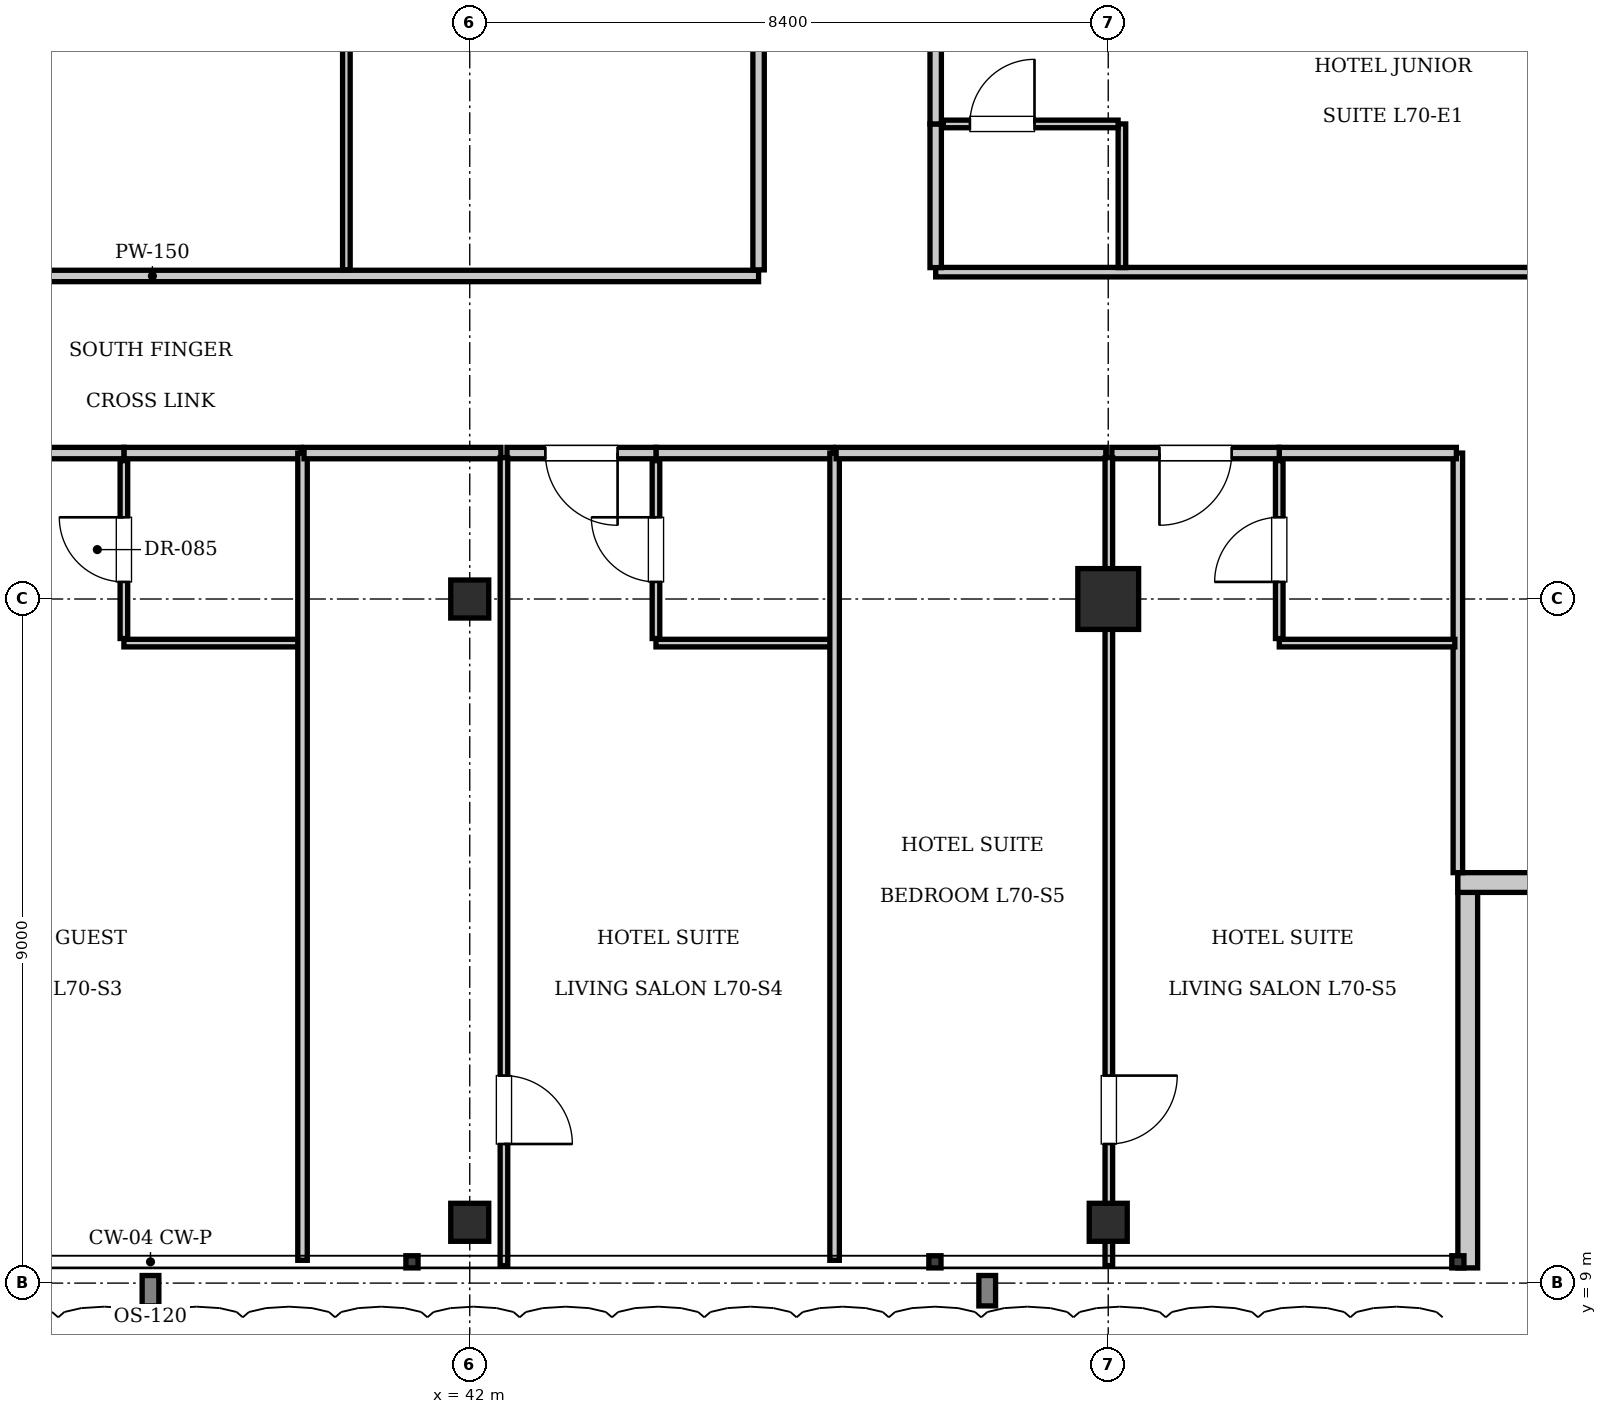
"""IFC4 building model, lengths in metres.
Left out: names, types, materials, properties, quantities, classifications, styles, units other than length and angle.
Written with IfcOpenShell. Run it as: python <this file> out.ifc"""

import sys

from ifc_helpers import new_model, si_unit, direction, frame, frame_2d, origin, origin_2d, place, context, subcontext, project, spatial, rectangle, i_section, extrude, element, fill, save


model = new_model("IFC4")
c1 = context("Model", 3, precision=1e-05, world=origin(), true_north=direction((0.0, 1.0)))
c2 = subcontext(c1, "Body", "Model", "MODEL_VIEW")
j1 = project(units=[si_unit("LENGTHUNIT", "METRE"), si_unit("PLANEANGLEUNIT", "RADIAN")], contexts=[c1])
p1 = place(None, origin())
s1 = spatial("IfcSite", under=j1, at=p1, CompositionType="ELEMENT")
p2 = place(p1, origin())
s2 = spatial("IfcBuilding", under=s1, at=p2, CompositionType="ELEMENT")
p3 = place(p2, frame((0.0, 0.0, 285.6)))
s3 = spatial("IfcBuildingStorey", under=s2, at=p3, CompositionType="ELEMENT", Elevation=285.6)
p4 = place(p3, frame((50.4, 18.0, 0.0), z_axis=(0.0, 0.0, 1.0), x_axis=(1.0, 0.0, 0.0)))
e1 = element("IfcColumn", 1, at=p4, inside=s3, PredefinedType="COLUMN", context=c2, shape_type="SweptSolid", body=[
    extrude(rectangle(XDim=0.8, YDim=0.8, at=origin_2d()), origin(), (0.0, 0.0, 1.0), 3.85),
])
for number, where, z_axis, x_axis in (
    (2, (42.0, 18.0, 0.0), (0.0, 0.0, 1.0), (1.0, 0.0, 0.0)),
    (3, (42.0, 9.8, 0.0), (0.0, 0.0, 1.0), (1.0, 0.0, 0.0)),
    (4, (50.4, 9.8, 0.0), (0.0, 0.0, 1.0), (1.0, 0.0, 0.0)),
):
    element("IfcColumn", number, at=place(p3, frame(where, z_axis=z_axis, x_axis=x_axis)), inside=s3, PredefinedType="COLUMN", context=c2, shape_type="SweptSolid", body=[
        extrude(i_section(OverallWidth=0.5, OverallDepth=0.5, WebThickness=0.022, FlangeThickness=0.032, at=origin_2d()), origin(), (0.0, 0.0, 1.0), 3.85),
    ])
p5 = place(p3, frame((55.13, 14.4, 0.0), z_axis=(0.0, 0.0, 1.0), x_axis=(0.0, -1.0, 0.0)))
e5 = element("IfcWall", 5, at=p5, inside=s3, PredefinedType="SOLIDWALL", context=c2, shape_type="SweptSolid", body=[
    extrude(rectangle(XDim=5.2, YDim=0.26, at=frame_2d((2.6, 0.0))), origin(), (0.0, 0.0, 1.0), 3.61),
])
p6 = place(p3, frame((60.2, 14.27, 0.0), z_axis=(0.0, 0.0, 1.0), x_axis=(-1.0, 0.0, 0.0)))
e6 = element("IfcWall", 6, at=p6, inside=s3, PredefinedType="SOLIDWALL", context=c2, shape_type="SweptSolid", body=[
    extrude(rectangle(XDim=5.2, YDim=0.26, at=frame_2d((2.6, 0.0))), origin(), (0.0, 0.0, 1.0), 3.61),
])
p7 = place(p6, frame((1.6, 0.0, 0.9)))
e7 = element("IfcOpeningElement", 7, at=p7, cuts=e6, PredefinedType="OPENING", context=c2, shape_type="SweptSolid", body=[
    extrude(rectangle(XDim=2.0, YDim=2.2, at=frame_2d((1.0, 1.1))), frame((0.0, 0.14, 0.0), z_axis=(0.0, -1.0, 0.0), x_axis=(1.0, 0.0, 0.0)), (0.0, 0.0, 1.0), 0.28),
])
p8 = place(p3, frame((29.85, 22.25, 0.0), z_axis=(0.0, 0.0, 1.0), x_axis=(1.0, 0.0, 0.0)))
e8 = element("IfcWall", 8, at=p8, inside=s3, PredefinedType="PARTITIONING", context=c2, shape_type="SweptSolid", body=[
    extrude(rectangle(XDim=15.95, YDim=0.15, at=frame_2d((7.975, 0.0))), origin(), (0.0, 0.0, 1.0), 3.61),
])
p9 = place(p3, frame((45.8, 22.33, 0.0), z_axis=(0.0, 0.0, 1.0), x_axis=(0.0, 1.0, 0.0)))
e9 = element("IfcWall", 9, at=p9, inside=s3, PredefinedType="PARTITIONING", context=c2, shape_type="SweptSolid", body=[
    extrude(rectangle(XDim=7.69, YDim=0.15, at=frame_2d((3.845, 0.0))), origin(), (0.0, 0.0, 1.0), 3.61),
])
p10 = place(p3, frame((40.377, 22.33, 0.0), z_axis=(0.0, 0.0, 1.0), x_axis=(0.0, 1.0, 0.0)))
e10 = element("IfcWall", 10, at=p10, inside=s3, PredefinedType="PARTITIONING", context=c2, shape_type="SweptSolid", body=[
    extrude(rectangle(XDim=7.69, YDim=0.1, at=frame_2d((3.845, 0.0))), origin(), (0.0, 0.0, 1.0), 3.61),
])
p11 = place(p3, frame((55.0, 14.4, 0.0), z_axis=(0.0, 0.0, 1.0), x_axis=(0.0, 1.0, 0.0)))
e11 = element("IfcWall", 11, at=p11, inside=s3, PredefinedType="PARTITIONING", context=c2, shape_type="SweptSolid", body=[
    extrude(rectangle(XDim=5.52, YDim=0.125, at=frame_2d((2.76, 0.0))), origin(), (0.0, 0.0, 1.0), 3.61),
])
p12 = place(p3, frame((37.45, 19.92, 0.0), z_axis=(0.0, 0.0, 1.0), x_axis=(1.0, 0.0, 0.0)))
e12 = element("IfcWall", 12, at=p12, inside=s3, PredefinedType="PARTITIONING", context=c2, shape_type="SweptSolid", body=[
    extrude(rectangle(XDim=2.33, YDim=0.15, at=frame_2d((1.165, 0.0))), origin(), (0.0, 0.0, 1.0), 3.61),
])
p13 = place(p3, frame((37.45, 17.42, 0.0), z_axis=(0.0, 0.0, 1.0), x_axis=(1.0, 0.0, 0.0)))
e13 = element("IfcWall", 13, at=p13, inside=s3, PredefinedType="PARTITIONING", context=c2, shape_type="SweptSolid", body=[
    extrude(rectangle(XDim=2.31, YDim=0.1, at=frame_2d((1.155, 0.0))), origin(), (0.0, 0.0, 1.0), 3.61),
])
p14 = place(p3, frame((37.45, 17.48, 0.0), z_axis=(0.0, 0.0, 1.0), x_axis=(0.0, 1.0, 0.0)))
e14 = element("IfcWall", 14, at=p14, inside=s3, PredefinedType="PARTITIONING", context=c2, shape_type="SweptSolid", body=[
    extrude(rectangle(XDim=2.34, YDim=0.1, at=frame_2d((1.17, 0.0))), origin(), (0.0, 0.0, 1.0), 3.61),
])
p15 = place(p14, frame((0.745, 0.0, 0.0)))
e15 = element("IfcOpeningElement", 15, at=p15, cuts=e14, PredefinedType="OPENING", context=c2, shape_type="SweptSolid", body=[
    extrude(rectangle(XDim=0.85, YDim=2.1, at=frame_2d((0.425, 1.05))), frame((0.0, 0.06, 0.0), z_axis=(0.0, -1.0, 0.0), x_axis=(1.0, 0.0, 0.0)), (0.0, 0.0, 1.0), 0.12),
])
p16 = place(p3, frame((33.28, 19.92, 0.0), z_axis=(0.0, 0.0, 1.0), x_axis=(1.0, 0.0, 0.0)))
e16 = element("IfcWall", 16, at=p16, inside=s3, PredefinedType="PARTITIONING", context=c2, shape_type="SweptSolid", body=[
    extrude(rectangle(XDim=4.17, YDim=0.15, at=frame_2d((2.085, 0.0))), origin(), (0.0, 0.0, 1.0), 3.61),
])
p17 = place(p16, frame((1.61, 0.0, 0.0)))
e17 = element("IfcOpeningElement", 17, at=p17, cuts=e16, PredefinedType="OPENING", context=c2, shape_type="SweptSolid", body=[
    extrude(rectangle(XDim=0.95, YDim=2.15, at=frame_2d((0.475, 1.075))), frame((0.0, 0.085, 0.0), z_axis=(0.0, -1.0, 0.0), x_axis=(1.0, 0.0, 0.0)), (0.0, 0.0, 1.0), 0.17),
])
p18 = place(p3, frame((39.8, 9.3, 0.0), z_axis=(0.0, 0.0, 1.0), x_axis=(0.0, 1.0, 0.0)))
e18 = element("IfcWall", 18, at=p18, inside=s3, PredefinedType="PARTITIONING", context=c2, shape_type="SweptSolid", body=[
    extrude(rectangle(XDim=10.62, YDim=0.125, at=frame_2d((5.31, 0.0))), origin(), (0.0, 0.0, 1.0), 3.61),
])
p19 = place(p3, frame((44.45, 19.92, 0.0), z_axis=(0.0, 0.0, 1.0), x_axis=(1.0, 0.0, 0.0)))
e19 = element("IfcWall", 19, at=p19, inside=s3, PredefinedType="PARTITIONING", context=c2, shape_type="SweptSolid", body=[
    extrude(rectangle(XDim=2.33, YDim=0.15, at=frame_2d((1.165, 0.0))), origin(), (0.0, 0.0, 1.0), 3.61),
])
p20 = place(p3, frame((44.45, 17.42, 0.0), z_axis=(0.0, 0.0, 1.0), x_axis=(1.0, 0.0, 0.0)))
e20 = element("IfcWall", 20, at=p20, inside=s3, PredefinedType="PARTITIONING", context=c2, shape_type="SweptSolid", body=[
    extrude(rectangle(XDim=2.31, YDim=0.1, at=frame_2d((1.155, 0.0))), origin(), (0.0, 0.0, 1.0), 3.61),
])
p21 = place(p3, frame((44.45, 17.48, 0.0), z_axis=(0.0, 0.0, 1.0), x_axis=(0.0, 1.0, 0.0)))
e21 = element("IfcWall", 21, at=p21, inside=s3, PredefinedType="PARTITIONING", context=c2, shape_type="SweptSolid", body=[
    extrude(rectangle(XDim=2.34, YDim=0.1, at=frame_2d((1.17, 0.0))), origin(), (0.0, 0.0, 1.0), 3.61),
])
p22 = place(p21, frame((0.745, 0.0, 0.0)))
e22 = element("IfcOpeningElement", 22, at=p22, cuts=e21, PredefinedType="OPENING", context=c2, shape_type="SweptSolid", body=[
    extrude(rectangle(XDim=0.85, YDim=2.1, at=frame_2d((0.425, 1.05))), frame((0.0, 0.06, 0.0), z_axis=(0.0, -1.0, 0.0), x_axis=(1.0, 0.0, 0.0)), (0.0, 0.0, 1.0), 0.12),
])
p23 = place(p3, frame((39.82, 19.92, 0.0), z_axis=(0.0, 0.0, 1.0), x_axis=(1.0, 0.0, 0.0)))
e23 = element("IfcWall", 23, at=p23, inside=s3, PredefinedType="PARTITIONING", context=c2, shape_type="SweptSolid", body=[
    extrude(rectangle(XDim=2.59, YDim=0.15, at=frame_2d((1.295, 0.0))), origin(), (0.0, 0.0, 1.0), 3.61),
])
p24 = place(p3, frame((42.49, 19.92, 0.0), z_axis=(0.0, 0.0, 1.0), x_axis=(1.0, 0.0, 0.0)))
e24 = element("IfcWall", 24, at=p24, inside=s3, PredefinedType="PARTITIONING", context=c2, shape_type="SweptSolid", body=[
    extrude(rectangle(XDim=1.96, YDim=0.15, at=frame_2d((0.98, 0.0))), origin(), (0.0, 0.0, 1.0), 3.61),
])
p25 = place(p24, frame((0.505, 0.0, 0.0)))
e25 = element("IfcOpeningElement", 25, at=p25, cuts=e24, PredefinedType="OPENING", context=c2, shape_type="SweptSolid", body=[
    extrude(rectangle(XDim=0.95, YDim=2.15, at=frame_2d((0.475, 1.075))), frame((0.0, 0.085, 0.0), z_axis=(0.0, -1.0, 0.0), x_axis=(1.0, 0.0, 0.0)), (0.0, 0.0, 1.0), 0.17),
])
p26 = place(p3, frame((42.45, 9.23, 0.0), z_axis=(0.0, 0.0, 1.0), x_axis=(0.0, 1.0, 0.0)))
e26 = element("IfcWall", 26, at=p26, inside=s3, PredefinedType="PARTITIONING", context=c2, shape_type="SweptSolid", body=[
    extrude(rectangle(XDim=10.63, YDim=0.1, at=frame_2d((5.315, 0.0))), origin(), (0.0, 0.0, 1.0), 3.61),
])
p27 = place(p26, frame((1.6, 0.0, 0.0)))
e27 = element("IfcOpeningElement", 27, at=p27, cuts=e26, PredefinedType="OPENING", context=c2, shape_type="SweptSolid", body=[
    extrude(rectangle(XDim=0.9, YDim=2.1, at=frame_2d((0.45, 1.05))), frame((0.0, 0.06, 0.0), z_axis=(0.0, -1.0, 0.0), x_axis=(1.0, 0.0, 0.0)), (0.0, 0.0, 1.0), 0.12),
])
p28 = place(p3, frame((46.8, 9.3, 0.0), z_axis=(0.0, 0.0, 1.0), x_axis=(0.0, 1.0, 0.0)))
e28 = element("IfcWall", 28, at=p28, inside=s3, PredefinedType="PARTITIONING", context=c2, shape_type="SweptSolid", body=[
    extrude(rectangle(XDim=10.62, YDim=0.125, at=frame_2d((5.31, 0.0))), origin(), (0.0, 0.0, 1.0), 3.61),
])
p29 = place(p3, frame((52.65, 19.92, 0.0), z_axis=(0.0, 0.0, 1.0), x_axis=(1.0, 0.0, 0.0)))
e29 = element("IfcWall", 29, at=p29, inside=s3, PredefinedType="PARTITIONING", context=c2, shape_type="SweptSolid", body=[
    extrude(rectangle(XDim=2.33, YDim=0.15, at=frame_2d((1.165, 0.0))), origin(), (0.0, 0.0, 1.0), 3.61),
])
p30 = place(p3, frame((52.65, 17.42, 0.0), z_axis=(0.0, 0.0, 1.0), x_axis=(1.0, 0.0, 0.0)))
e30 = element("IfcWall", 30, at=p30, inside=s3, PredefinedType="PARTITIONING", context=c2, shape_type="SweptSolid", body=[
    extrude(rectangle(XDim=2.31, YDim=0.1, at=frame_2d((1.155, 0.0))), origin(), (0.0, 0.0, 1.0), 3.61),
])
p31 = place(p3, frame((52.65, 17.48, 0.0), z_axis=(0.0, 0.0, 1.0), x_axis=(0.0, 1.0, 0.0)))
e31 = element("IfcWall", 31, at=p31, inside=s3, PredefinedType="PARTITIONING", context=c2, shape_type="SweptSolid", body=[
    extrude(rectangle(XDim=2.34, YDim=0.1, at=frame_2d((1.17, 0.0))), origin(), (0.0, 0.0, 1.0), 3.61),
])
p32 = place(p31, frame((0.745, 0.0, 0.0)))
e32 = element("IfcOpeningElement", 32, at=p32, cuts=e31, PredefinedType="OPENING", context=c2, shape_type="SweptSolid", body=[
    extrude(rectangle(XDim=0.85, YDim=2.1, at=frame_2d((0.425, 1.05))), frame((0.0, 0.06, 0.0), z_axis=(0.0, -1.0, 0.0), x_axis=(1.0, 0.0, 0.0)), (0.0, 0.0, 1.0), 0.12),
])
p33 = place(p3, frame((46.82, 19.92, 0.0), z_axis=(0.0, 0.0, 1.0), x_axis=(1.0, 0.0, 0.0)))
e33 = element("IfcWall", 33, at=p33, inside=s3, PredefinedType="PARTITIONING", context=c2, shape_type="SweptSolid", body=[
    extrude(rectangle(XDim=3.548, YDim=0.15, at=frame_2d((1.774, 0.0))), origin(), (0.0, 0.0, 1.0), 3.61),
])
p34 = place(p3, frame((50.448, 19.92, 0.0), z_axis=(0.0, 0.0, 1.0), x_axis=(1.0, 0.0, 0.0)))
e34 = element("IfcWall", 34, at=p34, inside=s3, PredefinedType="PARTITIONING", context=c2, shape_type="SweptSolid", body=[
    extrude(rectangle(XDim=2.202, YDim=0.15, at=frame_2d((1.101, 0.0))), origin(), (0.0, 0.0, 1.0), 3.61),
])
p35 = place(p34, frame((0.626, 0.0, 0.0)))
e35 = element("IfcOpeningElement", 35, at=p35, cuts=e34, PredefinedType="OPENING", context=c2, shape_type="SweptSolid", body=[
    extrude(rectangle(XDim=0.95, YDim=2.15, at=frame_2d((0.475, 1.075))), frame((0.0, 0.085, 0.0), z_axis=(0.0, -1.0, 0.0), x_axis=(1.0, 0.0, 0.0)), (0.0, 0.0, 1.0), 0.17),
])
p36 = place(p3, frame((50.408, 9.23, 0.0), z_axis=(0.0, 0.0, 1.0), x_axis=(0.0, 1.0, 0.0)))
e36 = element("IfcWall", 36, at=p36, inside=s3, PredefinedType="PARTITIONING", context=c2, shape_type="SweptSolid", body=[
    extrude(rectangle(XDim=10.63, YDim=0.1, at=frame_2d((5.315, 0.0))), origin(), (0.0, 0.0, 1.0), 3.081),
])
p37 = place(p36, frame((1.6, 0.0, 0.0)))
e37 = element("IfcOpeningElement", 37, at=p37, cuts=e36, PredefinedType="OPENING", context=c2, shape_type="SweptSolid", body=[
    extrude(rectangle(XDim=0.9, YDim=2.1, at=frame_2d((0.45, 1.05))), frame((0.0, 0.06, 0.0), z_axis=(0.0, -1.0, 0.0), x_axis=(1.0, 0.0, 0.0)), (0.0, 0.0, 1.0), 0.12),
])
p38 = place(p3, frame((48.13, 22.3, 0.0), z_axis=(0.0, 0.0, 1.0), x_axis=(1.0, 0.0, 0.0)))
e38 = element("IfcWall", 38, at=p38, inside=s3, PredefinedType="PARTITIONING", context=c2, shape_type="SweptSolid", body=[
    extrude(rectangle(XDim=11.97, YDim=0.125, at=frame_2d((5.985, 0.0))), origin(), (0.0, 0.0, 1.0), 3.61),
])
p39 = place(p3, frame((48.13, 22.36, 0.0), z_axis=(0.0, 0.0, 1.0), x_axis=(0.0, 1.0, 0.0)))
e39 = element("IfcWall", 39, at=p39, inside=s3, PredefinedType="PARTITIONING", context=c2, shape_type="SweptSolid", body=[
    extrude(rectangle(XDim=1.89, YDim=0.15, at=frame_2d((0.945, 0.0))), origin(), (0.0, 0.0, 1.0), 3.61),
])
p40 = place(p3, frame((48.13, 24.25, 0.0), z_axis=(0.0, 0.0, 1.0), x_axis=(0.0, 1.0, 0.0)))
e40 = element("IfcWall", 40, at=p40, inside=s3, PredefinedType="PARTITIONING", context=c2, shape_type="SweptSolid", body=[
    extrude(rectangle(XDim=3.03, YDim=0.15, at=frame_2d((1.515, 0.0))), origin(), (0.0, 0.0, 1.0), 3.61),
])
p41 = place(p40, frame((1.04, 0.0, 0.0)))
e41 = element("IfcOpeningElement", 41, at=p41, cuts=e40, PredefinedType="OPENING", context=c2, shape_type="SweptSolid", body=[
    extrude(rectangle(XDim=0.95, YDim=2.15, at=frame_2d((0.475, 1.075))), frame((0.0, 0.085, 0.0), z_axis=(0.0, -1.0, 0.0), x_axis=(1.0, 0.0, 0.0)), (0.0, 0.0, 1.0), 0.17),
])
p42 = place(p3, frame((50.58, 22.36, 0.0), z_axis=(0.0, 0.0, 1.0), x_axis=(0.0, 1.0, 0.0)))
e42 = element("IfcWall", 42, at=p42, inside=s3, PredefinedType="PARTITIONING", context=c2, shape_type="SweptSolid", body=[
    extrude(rectangle(XDim=1.89, YDim=0.1, at=frame_2d((0.945, 0.0))), origin(), (0.0, 0.0, 1.0), 3.61),
])
p43 = place(p3, frame((48.23, 24.25, 0.0), z_axis=(0.0, 0.0, 1.0), x_axis=(1.0, 0.0, 0.0)))
e43 = element("IfcWall", 43, at=p43, inside=s3, PredefinedType="PARTITIONING", context=c2, shape_type="SweptSolid", body=[
    extrude(rectangle(XDim=2.3, YDim=0.1, at=frame_2d((1.15, 0.0))), origin(), (0.0, 0.0, 1.0), 3.61),
])
p44 = place(p43, frame((0.35, 0.0, 0.0)))
e44 = element("IfcOpeningElement", 44, at=p44, cuts=e43, PredefinedType="OPENING", context=c2, shape_type="SweptSolid", body=[
    extrude(rectangle(XDim=0.85, YDim=2.1, at=frame_2d((0.425, 1.05))), frame((0.0, 0.06, 0.0), z_axis=(0.0, -1.0, 0.0), x_axis=(1.0, 0.0, 0.0)), (0.0, 0.0, 1.0), 0.12),
])
p45 = place(p15, origin())
e45 = element("IfcDoor", 45, at=p45, inside=s3, OperationType="SINGLE_SWING_RIGHT", PredefinedType="DOOR", context=c2, shape_type="SweptSolid", body=[
    extrude(rectangle(XDim=0.85, YDim=2.1, at=frame_2d((0.425, 1.05))), frame((0.0, 0.025, 0.0), z_axis=(0.0, -1.0, 0.0), x_axis=(1.0, 0.0, 0.0)), (0.0, 0.0, 1.0), 0.05),
])
fill(e15, e45)
p46 = place(p22, origin())
e46 = element("IfcDoor", 46, at=p46, inside=s3, OperationType="SINGLE_SWING_RIGHT", PredefinedType="DOOR", context=c2, shape_type="SweptSolid", body=[
    extrude(rectangle(XDim=0.85, YDim=2.1, at=frame_2d((0.425, 1.05))), frame((0.0, 0.025, 0.0), z_axis=(0.0, -1.0, 0.0), x_axis=(1.0, 0.0, 0.0)), (0.0, 0.0, 1.0), 0.05),
])
fill(e22, e46)
p47 = place(p25, frame((0.95, 0.0, 0.0), z_axis=(0.0, 0.0, 1.0), x_axis=(-1.0, 0.0, 0.0)))
e47 = element("IfcDoor", 47, at=p47, inside=s3, OperationType="SINGLE_SWING_LEFT", PredefinedType="DOOR", context=c2, shape_type="SweptSolid", body=[
    extrude(rectangle(XDim=0.95, YDim=2.15, at=frame_2d((0.475, 1.075))), frame((0.0, 0.025, 0.0), z_axis=(0.0, -1.0, 0.0), x_axis=(1.0, 0.0, 0.0)), (0.0, 0.0, 1.0), 0.05),
])
fill(e25, e47)
p48 = place(p27, frame((0.9, 0.0, 0.0), z_axis=(0.0, 0.0, 1.0), x_axis=(-1.0, 0.0, 0.0)))
e48 = element("IfcDoor", 48, at=p48, inside=s3, OperationType="SINGLE_SWING_RIGHT", PredefinedType="DOOR", context=c2, shape_type="SweptSolid", body=[
    extrude(rectangle(XDim=0.9, YDim=2.1, at=frame_2d((0.45, 1.05))), frame((0.0, 0.025, 0.0), z_axis=(0.0, -1.0, 0.0), x_axis=(1.0, 0.0, 0.0)), (0.0, 0.0, 1.0), 0.05),
])
fill(e27, e48)
p49 = place(p32, origin())
e49 = element("IfcDoor", 49, at=p49, inside=s3, OperationType="SINGLE_SWING_LEFT", PredefinedType="DOOR", context=c2, shape_type="SweptSolid", body=[
    extrude(rectangle(XDim=0.85, YDim=2.1, at=frame_2d((0.425, 1.05))), frame((0.0, 0.025, 0.0), z_axis=(0.0, -1.0, 0.0), x_axis=(1.0, 0.0, 0.0)), (0.0, 0.0, 1.0), 0.05),
])
fill(e32, e49)
p50 = place(p35, frame((0.95, 0.0, 0.0), z_axis=(0.0, 0.0, 1.0), x_axis=(-1.0, 0.0, 0.0)))
e50 = element("IfcDoor", 50, at=p50, inside=s3, OperationType="SINGLE_SWING_RIGHT", PredefinedType="DOOR", context=c2, shape_type="SweptSolid", body=[
    extrude(rectangle(XDim=0.95, YDim=2.15, at=frame_2d((0.475, 1.075))), frame((0.0, 0.025, 0.0), z_axis=(0.0, -1.0, 0.0), x_axis=(1.0, 0.0, 0.0)), (0.0, 0.0, 1.0), 0.05),
])
fill(e35, e50)
p51 = place(p37, frame((0.9, 0.0, 0.0), z_axis=(0.0, 0.0, 1.0), x_axis=(-1.0, 0.0, 0.0)))
e51 = element("IfcDoor", 51, at=p51, inside=s3, OperationType="SINGLE_SWING_LEFT", PredefinedType="DOOR", context=c2, shape_type="SweptSolid", body=[
    extrude(rectangle(XDim=0.9, YDim=2.1, at=frame_2d((0.45, 1.05))), frame((0.0, 0.025, 0.0), z_axis=(0.0, -1.0, 0.0), x_axis=(1.0, 0.0, 0.0)), (0.0, 0.0, 1.0), 0.05),
])
fill(e37, e51)
p52 = place(p44, origin())
e52 = element("IfcDoor", 52, at=p52, inside=s3, OperationType="SINGLE_SWING_RIGHT", PredefinedType="DOOR", context=c2, shape_type="SweptSolid", body=[
    extrude(rectangle(XDim=0.85, YDim=2.1, at=frame_2d((0.425, 1.05))), frame((0.0, 0.025, 0.0), z_axis=(0.0, -1.0, 0.0), x_axis=(1.0, 0.0, 0.0)), (0.0, 0.0, 1.0), 0.05),
])
fill(e44, e52)
save(model, sys.argv[1])
